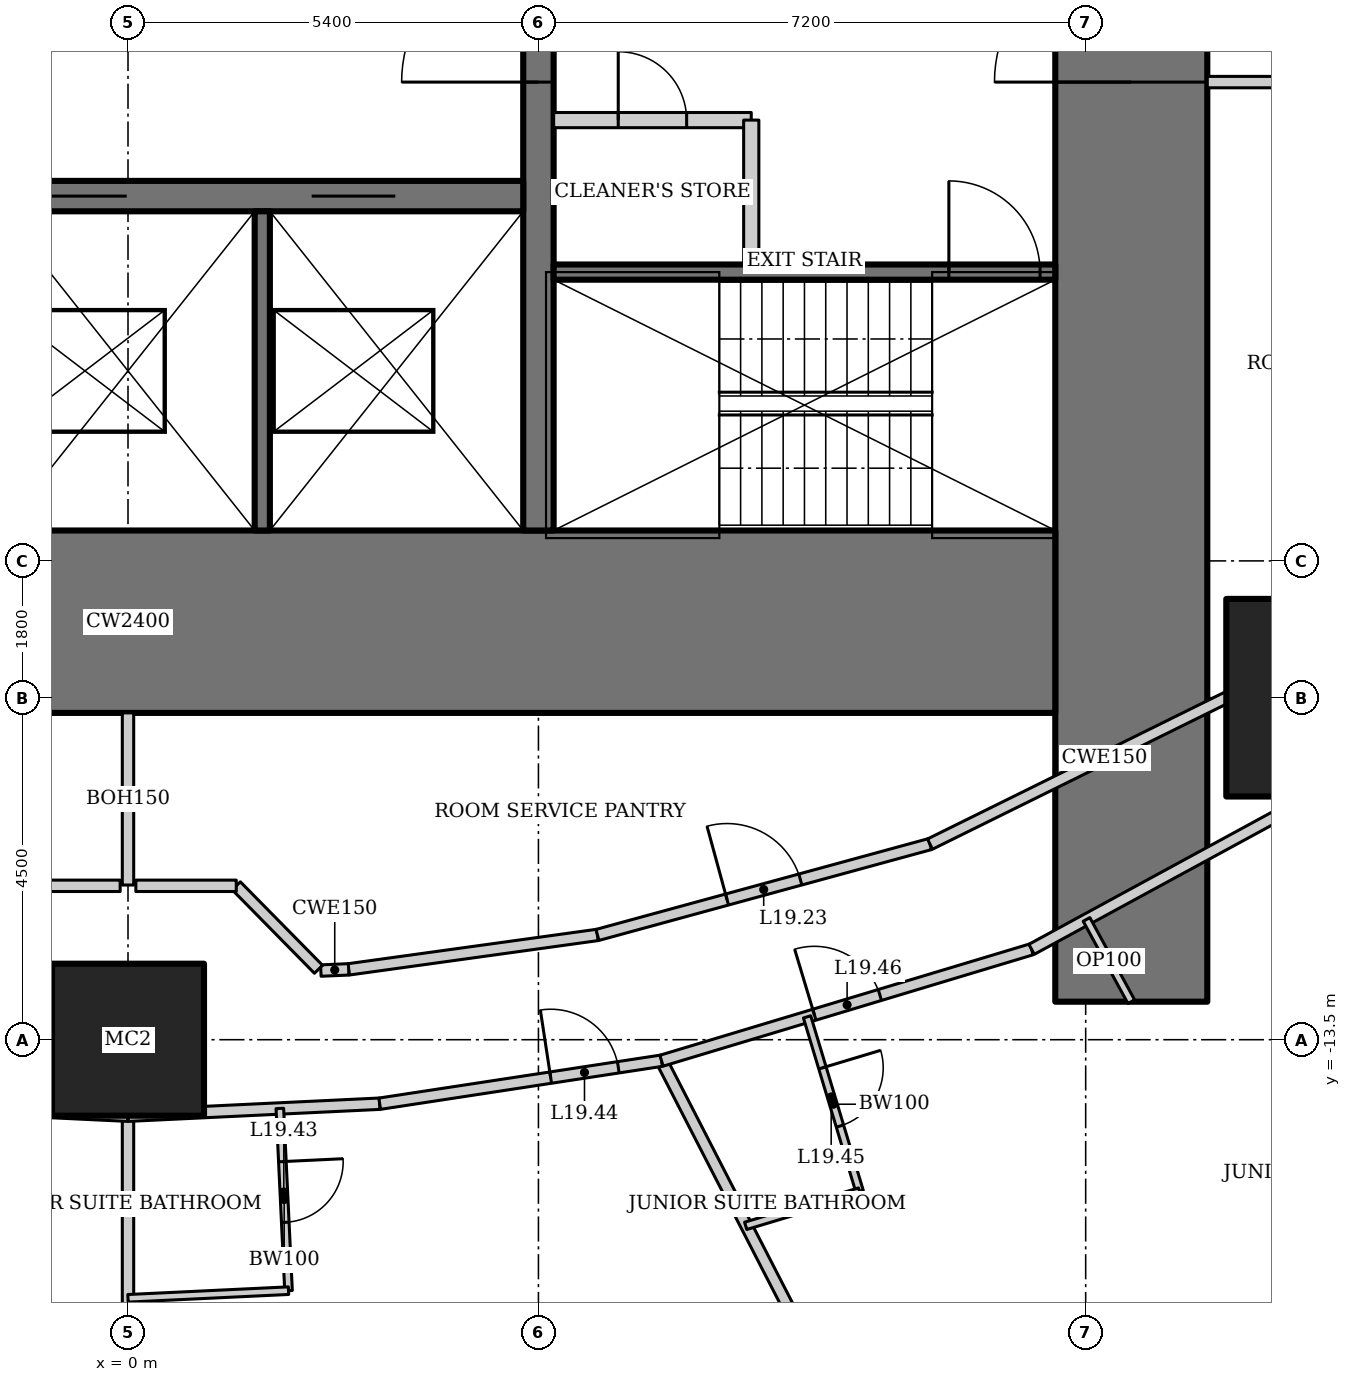
"""IFC4 building model, lengths in metres.
Left out: names, types, materials, properties, quantities, classifications, styles, units other than length and angle.
Written with IfcOpenShell. Run it as: python <this file> out.ifc"""

import sys

from ifc_helpers import new_model, si_unit, direction, frame, frame_2d, origin, origin_2d, place, context, subcontext, project, spatial, rectangle, hollow_rectangle, extrude, element, fill, save


model = new_model("IFC4")
c1 = context("Model", 3, precision=1e-05, world=origin(), true_north=direction((0.0, 1.0)))
c2 = subcontext(c1, "Body", "Model", "MODEL_VIEW")
j1 = project(units=[si_unit("LENGTHUNIT", "METRE"), si_unit("PLANEANGLEUNIT", "RADIAN")], contexts=[c1])
p1 = place(None, origin())
s1 = spatial("IfcSite", under=j1, at=p1, CompositionType="ELEMENT")
p2 = place(p1, origin())
s2 = spatial("IfcBuilding", under=s1, at=p2, CompositionType="ELEMENT")
p3 = place(p2, frame((0.0, 0.0, 83.8)))
s3 = spatial("IfcBuildingStorey", under=s2, at=p3, CompositionType="ELEMENT", Elevation=83.8)
p4 = place(p3, frame((0.0, -13.5, 0.0), z_axis=(0.0, 0.0, 1.0), x_axis=(1.0, 0.0, 0.0)))
e1 = element("IfcColumn", 1, at=p4, inside=s3, PredefinedType="COLUMN", context=c2, shape_type="SweptSolid", body=[
    extrude(hollow_rectangle(XDim=2.0, YDim=2.0, WallThickness=0.17, at=origin_2d()), origin(), (0.0, 0.0, 1.0), 3.6),
])
p5 = place(p3, frame((15.75, -9.0, 0.0), z_axis=(0.0, 0.0, 1.0), x_axis=(1.0, 0.0, 0.0)))
e2 = element("IfcColumn", 2, at=p5, inside=s3, PredefinedType="COLUMN", context=c2, shape_type="SweptSolid", body=[
    extrude(hollow_rectangle(XDim=2.6, YDim=2.6, WallThickness=0.13, at=origin_2d()), origin(), (0.0, 0.0, 1.0), 3.6),
])
p6 = place(p3, frame((13.2, -13.0, 0.0), z_axis=(0.0, 0.0, 1.0), x_axis=(0.0, 1.0, 0.0)))
e3 = element("IfcWall", 3, at=p6, inside=s3, PredefinedType="SHEAR", context=c2, shape_type="SweptSolid", body=[
    extrude(rectangle(XDim=26.0, YDim=2.0, at=frame_2d((13.0, 0.0))), origin(), (0.0, 0.0, 1.0), 3.6),
])
p7 = place(p6, frame((12.1, 0.0, 0.0)))
e4 = element("IfcOpeningElement", 4, at=p7, cuts=e3, PredefinedType="OPENING", context=c2, shape_type="SweptSolid", body=[
    extrude(rectangle(XDim=1.8, YDim=2.1, at=frame_2d((0.9, 1.05))), frame((0.0, 1.01, 0.0), z_axis=(0.0, -1.0, 0.0), x_axis=(1.0, 0.0, 0.0)), (0.0, 0.0, 1.0), 2.02),
])
p8 = place(p3, frame((-12.2, -8.0, 0.0), z_axis=(0.0, 0.0, 1.0), x_axis=(1.0, 0.0, 0.0)))
e5 = element("IfcWall", 5, at=p8, inside=s3, PredefinedType="SHEAR", context=c2, shape_type="SweptSolid", body=[
    extrude(rectangle(XDim=24.4, YDim=2.4, at=frame_2d((12.2, 0.0))), origin(), (0.0, 0.0, 1.0), 3.6),
])
p9 = place(p3, frame((5.4, -6.8, 0.0), z_axis=(0.0, 0.0, 1.0), x_axis=(0.0, 1.0, 0.0)))
e6 = element("IfcWall", 6, at=p9, inside=s3, PredefinedType="SHEAR", context=c2, shape_type="SweptSolid", body=[
    extrude(rectangle(XDim=13.6, YDim=0.4, at=frame_2d((6.8, 0.0))), origin(), (0.0, 0.0, 1.0), 3.6),
])
p10 = place(p9, frame((5.9, 0.0, 0.0)))
e7 = element("IfcOpeningElement", 7, at=p10, cuts=e6, PredefinedType="OPENING", context=c2, shape_type="SweptSolid", body=[
    extrude(rectangle(XDim=1.8, YDim=2.1, at=frame_2d((0.9, 1.05))), frame((0.0, 0.21, 0.0), z_axis=(0.0, -1.0, 0.0), x_axis=(1.0, 0.0, 0.0)), (0.0, 0.0, 1.0), 0.42),
])
p11 = place(p3, frame((-5.2, -2.4, 0.0), z_axis=(0.0, 0.0, 1.0), x_axis=(1.0, 0.0, 0.0)))
e8 = element("IfcWall", 8, at=p11, inside=s3, PredefinedType="SHEAR", context=c2, shape_type="SweptSolid", body=[
    extrude(rectangle(XDim=10.4, YDim=0.4, at=frame_2d((5.2, 0.0))), origin(), (0.0, 0.0, 1.0), 3.6),
])
p12 = place(p11, frame((0.55, 0.0, 0.0)))
e9 = element("IfcOpeningElement", 9, at=p12, cuts=e8, PredefinedType="OPENING", context=c2, shape_type="SweptSolid", body=[
    extrude(rectangle(XDim=1.1, YDim=2.2, at=frame_2d((0.55, 1.1))), frame((0.0, 0.21, 0.0), z_axis=(0.0, -1.0, 0.0), x_axis=(1.0, 0.0, 0.0)), (0.0, 0.0, 1.0), 0.42),
])
p13 = place(p11, frame((4.083, 0.0, 0.0)))
e10 = element("IfcOpeningElement", 10, at=p13, cuts=e8, PredefinedType="OPENING", context=c2, shape_type="SweptSolid", body=[
    extrude(rectangle(XDim=1.1, YDim=2.2, at=frame_2d((0.55, 1.1))), frame((0.0, 0.21, 0.0), z_axis=(0.0, -1.0, 0.0), x_axis=(1.0, 0.0, 0.0)), (0.0, 0.0, 1.0), 0.42),
])
p14 = place(p11, frame((7.617, 0.0, 0.0)))
e11 = element("IfcOpeningElement", 11, at=p14, cuts=e8, PredefinedType="OPENING", context=c2, shape_type="SweptSolid", body=[
    extrude(rectangle(XDim=1.1, YDim=2.2, at=frame_2d((0.55, 1.1))), frame((0.0, 0.21, 0.0), z_axis=(0.0, -1.0, 0.0), x_axis=(1.0, 0.0, 0.0)), (0.0, 0.0, 1.0), 0.42),
])
p15 = place(p3, frame((1.767, -2.6, 0.0), z_axis=(0.0, 0.0, 1.0), x_axis=(0.0, -1.0, 0.0)))
e12 = element("IfcWall", 12, at=p15, inside=s3, PredefinedType="SOLIDWALL", context=c2, shape_type="SweptSolid", body=[
    extrude(rectangle(XDim=4.2, YDim=0.2, at=frame_2d((2.1, 0.0))), origin(), (0.0, 0.0, 1.0), 3.6),
])
p16 = place(p3, frame((5.6, -3.4, 0.0), z_axis=(0.0, 0.0, 1.0), x_axis=(1.0, 0.0, 0.0)))
e13 = element("IfcWall", 13, at=p16, inside=s3, PredefinedType="SHEAR", context=c2, shape_type="SweptSolid", body=[
    extrude(rectangle(XDim=6.6, YDim=0.2, at=frame_2d((3.3, 0.0))), origin(), (0.0, 0.0, 1.0), 3.6),
])
p17 = place(p16, frame((5.2, 0.0, 0.0)))
e14 = element("IfcOpeningElement", 14, at=p17, cuts=e13, PredefinedType="OPENING", context=c2, shape_type="SweptSolid", body=[
    extrude(rectangle(XDim=1.2, YDim=2.1, at=frame_2d((0.6, 1.05))), frame((0.0, 0.11, 0.0), z_axis=(0.0, -1.0, 0.0), x_axis=(1.0, 0.0, 0.0)), (0.0, 0.0, 1.0), 0.22),
])
p18 = place(p3, frame((5.6, -1.4, 0.0), z_axis=(0.0, 0.0, 1.0), x_axis=(1.0, 0.0, 0.0)))
e15 = element("IfcWall", 15, at=p18, inside=s3, PredefinedType="SOLIDWALL", context=c2, shape_type="SweptSolid", body=[
    extrude(rectangle(XDim=2.6, YDim=0.2, at=frame_2d((1.3, 0.0))), origin(), (0.0, 0.0, 1.0), 3.45),
])
p19 = place(p18, frame((0.85, 0.0, 0.0)))
e16 = element("IfcOpeningElement", 16, at=p19, cuts=e15, PredefinedType="OPENING", context=c2, shape_type="SweptSolid", body=[
    extrude(rectangle(XDim=0.9, YDim=2.1, at=frame_2d((0.45, 1.05))), frame((0.0, 0.11, 0.0), z_axis=(0.0, -1.0, 0.0), x_axis=(1.0, 0.0, 0.0)), (0.0, 0.0, 1.0), 0.22),
])
p20 = place(p3, frame((8.2, -1.4, 0.0), z_axis=(0.0, 0.0, 1.0), x_axis=(0.0, -1.0, 0.0)))
e17 = element("IfcWall", 17, at=p20, inside=s3, PredefinedType="SOLIDWALL", context=c2, shape_type="SweptSolid", body=[
    extrude(rectangle(XDim=1.9, YDim=0.2, at=frame_2d((0.95, 0.0))), origin(), (0.0, 0.0, 1.0), 3.45),
])
p21 = place(p3, frame((0.0, -22.825, 0.0), z_axis=(0.0, 0.0, 1.0), x_axis=(0.0, 1.0, 0.0)))
e18 = element("IfcWall", 18, at=p21, inside=s3, PredefinedType="PARTITIONING", context=c2, shape_type="SweptSolid", body=[
    extrude(rectangle(XDim=8.325, YDim=0.15, at=frame_2d((4.162, 0.0))), origin(), (0.0, 0.0, 1.0), 2.924),
])
p22 = place(p3, frame((10.912, -21.346, 0.0), z_axis=(0.0, 0.0, 1.0), x_axis=(-0.457327273085, 0.889298468059, 0.0)))
e19 = element("IfcWall", 19, at=p22, inside=s3, PredefinedType="PARTITIONING", context=c2, shape_type="SweptSolid", body=[
    extrude(rectangle(XDim=8.511, YDim=0.15, at=frame_2d((4.256, 0.0))), origin(), (0.0, 0.0, 1.0), 2.528),
])
p23 = place(p3, frame((-3.311, -14.342, 0.0), z_axis=(0.0, 0.0, 1.0), x_axis=(0.998863968075, -0.047652631422, 0.0)))
e20 = element("IfcWall", 20, at=p23, inside=s3, PredefinedType="PARTITIONING", context=c2, shape_type="SweptSolid", body=[
    extrude(rectangle(XDim=3.315, YDim=0.15, at=frame_2d((1.657, 0.0))), origin(), (0.0, 0.0, 1.0), 3.45),
])
p24 = place(p23, frame((0.15, 0.0, 0.0)))
e21 = element("IfcOpeningElement", 21, at=p24, cuts=e20, PredefinedType="OPENING", context=c2, shape_type="SweptSolid", body=[
    extrude(rectangle(XDim=0.9, YDim=2.1, at=frame_2d((0.45, 1.05))), frame((0.0, 0.085, 0.0), z_axis=(0.0, -1.0, 0.0), x_axis=(1.0, 0.0, 0.0)), (0.0, 0.0, 1.0), 0.17),
])
p25 = place(p3, frame((0.0, -14.5, 0.0), z_axis=(0.0, 0.0, 1.0), x_axis=(0.998863968075, 0.047652631422, 0.0)))
e22 = element("IfcWall", 22, at=p25, inside=s3, PredefinedType="PARTITIONING", context=c2, shape_type="SweptSolid", body=[
    extrude(rectangle(XDim=3.315, YDim=0.15, at=frame_2d((1.657, 0.0))), origin(), (0.0, 0.0, 1.0), 3.45),
])
p26 = place(p3, frame((3.311, -14.342, 0.0), z_axis=(0.0, 0.0, 1.0), x_axis=(0.988564270062, 0.150800145746, 0.0)))
e23 = element("IfcWall", 23, at=p26, inside=s3, PredefinedType="PARTITIONING", context=c2, shape_type="SweptSolid", body=[
    extrude(rectangle(XDim=3.751, YDim=0.15, at=frame_2d((1.875, 0.0))), origin(), (0.0, 0.0, 1.0), 3.45),
])
p27 = place(p26, frame((2.276, 0.0, 0.0)))
e24 = element("IfcOpeningElement", 24, at=p27, cuts=e23, PredefinedType="OPENING", context=c2, shape_type="SweptSolid", body=[
    extrude(rectangle(XDim=0.9, YDim=2.1, at=frame_2d((0.45, 1.05))), frame((0.0, 0.085, 0.0), z_axis=(0.0, -1.0, 0.0), x_axis=(1.0, 0.0, 0.0)), (0.0, 0.0, 1.0), 0.17),
])
p28 = place(p3, frame((7.019, -13.776, 0.0), z_axis=(0.0, 0.0, 1.0), x_axis=(0.957564241242, 0.288219922793, 0.0)))
e25 = element("IfcWall", 25, at=p28, inside=s3, PredefinedType="PARTITIONING", context=c2, shape_type="SweptSolid", body=[
    extrude(rectangle(XDim=5.085, YDim=0.15, at=frame_2d((2.542, 0.0))), origin(), (0.0, 0.0, 1.0), 3.45),
])
p29 = place(p28, frame((2.1, 0.0, 0.0)))
e26 = element("IfcOpeningElement", 26, at=p29, cuts=e25, PredefinedType="OPENING", context=c2, shape_type="SweptSolid", body=[
    extrude(rectangle(XDim=0.9, YDim=2.1, at=frame_2d((0.45, 1.05))), frame((0.0, 0.085, 0.0), z_axis=(0.0, -1.0, 0.0), x_axis=(1.0, 0.0, 0.0)), (0.0, 0.0, 1.0), 0.17),
])
p30 = place(p3, frame((11.888, -12.311, 0.0), z_axis=(0.0, 0.0, 1.0), x_axis=(0.878450059298, 0.477834169267, 0.0)))
e27 = element("IfcWall", 27, at=p30, inside=s3, PredefinedType="PARTITIONING", context=c2, shape_type="SweptSolid", body=[
    extrude(rectangle(XDim=5.631, YDim=0.15, at=frame_2d((2.815, 0.0))), origin(), (0.0, 0.0, 1.0), 3.45),
])
p31 = place(p3, frame((2.903, -12.574, 0.0), z_axis=(0.0, 0.0, 1.0), x_axis=(0.990563451353, 0.137054911782, 0.0)))
e28 = element("IfcWall", 28, at=p31, inside=s3, PredefinedType="PARTITIONING", context=c2, shape_type="SweptSolid", body=[
    extrude(rectangle(XDim=3.304, YDim=0.15, at=frame_2d((1.652, 0.0))), origin(), (0.0, 0.0, 1.0), 3.45),
])
p32 = place(p3, frame((6.176, -12.122, 0.0), z_axis=(0.0, 0.0, 1.0), x_axis=(0.964644466646, 0.263554648923, 0.0)))
e29 = element("IfcWall", 29, at=p32, inside=s3, PredefinedType="PARTITIONING", context=c2, shape_type="SweptSolid", body=[
    extrude(rectangle(XDim=4.535, YDim=0.15, at=frame_2d((2.268, 0.0))), origin(), (0.0, 0.0, 1.0), 3.45),
])
p33 = place(p32, frame((1.768, 0.0, 0.0)))
e30 = element("IfcOpeningElement", 30, at=p33, cuts=e29, PredefinedType="OPENING", context=c2, shape_type="SweptSolid", body=[
    extrude(rectangle(XDim=1.0, YDim=2.1, at=frame_2d((0.5, 1.05))), frame((0.0, 0.085, 0.0), z_axis=(0.0, -1.0, 0.0), x_axis=(1.0, 0.0, 0.0)), (0.0, 0.0, 1.0), 0.17),
])
p34 = place(p3, frame((10.551, -10.926, 0.0), z_axis=(0.0, 0.0, 1.0), x_axis=(0.89656943448, 0.442903205177, 0.0)))
e31 = element("IfcWall", 31, at=p34, inside=s3, PredefinedType="PARTITIONING", context=c2, shape_type="SweptSolid", body=[
    extrude(rectangle(XDim=5.126, YDim=0.15, at=frame_2d((2.563, 0.0))), origin(), (0.0, 0.0, 1.0), 3.45),
])
p35 = place(p3, frame((1.998, -14.405, 0.0), z_axis=(0.0, 0.0, 1.0), x_axis=(0.047608648396, -0.998866065395, 0.0)))
e32 = element("IfcWall", 32, at=p35, inside=s3, PredefinedType="PARTITIONING", context=c2, shape_type="SweptSolid", body=[
    extrude(rectangle(XDim=2.4, YDim=0.1, at=frame_2d((1.2, 0.0))), origin(), (0.0, 0.0, 1.0), 2.749),
])
p36 = place(p35, frame((0.7, 0.0, 0.0)))
e33 = element("IfcOpeningElement", 33, at=p36, cuts=e32, PredefinedType="OPENING", context=c2, shape_type="SweptSolid", body=[
    extrude(rectangle(XDim=0.8, YDim=2.1, at=frame_2d((0.4, 1.05))), frame((0.0, 0.06, 0.0), z_axis=(0.0, -1.0, 0.0), x_axis=(1.0, 0.0, 0.0)), (0.0, 0.0, 1.0), 0.12),
])
p37 = place(p3, frame((2.112, -16.802, 0.0), z_axis=(0.0, 0.0, 1.0), x_axis=(-0.998862383453, -0.047685835668, 0.0)))
e34 = element("IfcWall", 34, at=p37, inside=s3, PredefinedType="PARTITIONING", context=c2, shape_type="SweptSolid", body=[
    extrude(rectangle(XDim=2.115, YDim=0.1, at=frame_2d((1.057, 0.0))), origin(), (0.0, 0.0, 1.0), 3.45),
])
p38 = place(p3, frame((8.935, -13.2, 0.0), z_axis=(0.0, 0.0, 1.0), x_axis=(0.288197066254, -0.957571120598, 0.0)))
e35 = element("IfcWall", 35, at=p38, inside=s3, PredefinedType="PARTITIONING", context=c2, shape_type="SweptSolid", body=[
    extrude(rectangle(XDim=2.4, YDim=0.1, at=frame_2d((1.2, 0.0))), origin(), (0.0, 0.0, 1.0), 3.45),
])
p39 = place(p38, frame((0.7, 0.0, 0.0)))
e36 = element("IfcOpeningElement", 36, at=p39, cuts=e35, PredefinedType="OPENING", context=c2, shape_type="SweptSolid", body=[
    extrude(rectangle(XDim=0.8, YDim=2.1, at=frame_2d((0.4, 1.05))), frame((0.0, 0.06, 0.0), z_axis=(0.0, -1.0, 0.0), x_axis=(1.0, 0.0, 0.0)), (0.0, 0.0, 1.0), 0.12),
])
p40 = place(p3, frame((9.626, -15.498, 0.0), z_axis=(0.0, 0.0, 1.0), x_axis=(-0.957551231109, -0.288263143328, 0.0)))
e37 = element("IfcWall", 37, at=p40, inside=s3, PredefinedType="PARTITIONING", context=c2, shape_type="SweptSolid", body=[
    extrude(rectangle(XDim=1.566, YDim=0.1, at=frame_2d((0.783, 0.0))), origin(), (0.0, 0.0, 1.0), 3.45),
])
p41 = place(p3, frame((13.2, -13.0, 0.0), z_axis=(0.0, 0.0, 1.0), x_axis=(-0.477852414256, 0.878440134665, 0.0)))
e38 = element("IfcWall", 38, at=p41, inside=s3, PredefinedType="PARTITIONING", context=c2, shape_type="SweptSolid", body=[
    extrude(rectangle(XDim=1.232, YDim=0.1, at=frame_2d((0.616, 0.0))), origin(), (0.0, 0.0, 1.0), 3.45),
])
p42 = place(p3, frame((2.537, -12.59, 0.0), z_axis=(0.0, 0.0, 1.0), x_axis=(0.999061181733, 0.04332153223, 0.0)))
e39 = element("IfcWall", 39, at=p42, inside=s3, PredefinedType="PARTITIONING", context=c2, shape_type="SweptSolid", body=[
    extrude(rectangle(XDim=0.366, YDim=0.15, at=frame_2d((0.183, 0.0))), origin(), (0.0, 0.0, 1.0), 3.45),
])
p43 = place(p3, frame((0.0, -9.2, 0.0), z_axis=(0.0, 0.0, 1.0), x_axis=(0.0, -1.0, 0.0)))
e40 = element("IfcWall", 40, at=p43, inside=s3, PredefinedType="PARTITIONING", context=c2, shape_type="SweptSolid", body=[
    extrude(rectangle(XDim=2.265, YDim=0.15, at=frame_2d((1.133, 0.0))), origin(), (0.0, 0.0, 1.0), 3.043),
])
p44 = place(p3, frame((-1.425, -11.475, 0.0), z_axis=(0.0, 0.0, 1.0), x_axis=(1.0, 0.0, 0.0)))
e41 = element("IfcWall", 41, at=p44, inside=s3, PredefinedType="PARTITIONING", context=c2, shape_type="SweptSolid", body=[
    extrude(rectangle(XDim=1.321, YDim=0.15, at=frame_2d((0.661, 0.0))), origin(), (0.0, 0.0, 1.0), 3.45),
])
p45 = place(p3, frame((1.425, -11.475, 0.0), z_axis=(0.0, 0.0, 1.0), x_axis=(0.701622806479, -0.712548550927, 0.0)))
e42 = element("IfcWall", 42, at=p45, inside=s3, PredefinedType="PARTITIONING", context=c2, shape_type="SweptSolid", body=[
    extrude(rectangle(XDim=1.542, YDim=0.15, at=frame_2d((0.771, 0.0))), origin(), (0.0, 0.0, 1.0), 3.45),
])
p46 = place(p3, frame((0.103, -11.475, 0.0), z_axis=(0.0, 0.0, 1.0), x_axis=(1.0, 0.0, 0.0)))
e43 = element("IfcWall", 43, at=p46, inside=s3, PredefinedType="PARTITIONING", context=c2, shape_type="SweptSolid", body=[
    extrude(rectangle(XDim=1.321, YDim=0.15, at=frame_2d((0.661, 0.0))), origin(), (0.0, 0.0, 1.0), 3.45),
])
p47 = place(p3, frame((14.2, -0.9, 0.0), z_axis=(0.0, 0.0, 1.0), x_axis=(1.0, 0.0, 0.0)))
e44 = element("IfcWall", 44, at=p47, inside=s3, PredefinedType="PARTITIONING", context=c2, shape_type="SweptSolid", body=[
    extrude(rectangle(XDim=0.965, YDim=0.15, at=frame_2d((0.482, 0.0))), origin(), (0.0, 0.0, 1.0), 3.45),
])
p48 = place(p19, origin())
e45 = element("IfcDoor", 45, at=p48, inside=s3, OperationType="SINGLE_SWING_LEFT", PredefinedType="DOOR", context=c2, shape_type="SweptSolid", body=[
    extrude(rectangle(XDim=0.9, YDim=2.1, at=frame_2d((0.45, 1.05))), frame((0.0, 0.025, 0.0), z_axis=(0.0, -1.0, 0.0), x_axis=(1.0, 0.0, 0.0)), (0.0, 0.0, 1.0), 0.05),
])
fill(e16, e45)
p49 = place(p10, origin())
e46 = element("IfcDoor", 46, at=p49, inside=s3, OperationType="DOUBLE_DOOR_DOUBLE_SWING", PredefinedType="DOOR", context=c2, shape_type="SweptSolid", body=[
    extrude(rectangle(XDim=1.8, YDim=2.1, at=frame_2d((0.9, 1.05))), frame((0.0, 0.025, 0.0), z_axis=(0.0, -1.0, 0.0), x_axis=(1.0, 0.0, 0.0)), (0.0, 0.0, 1.0), 0.05),
])
fill(e7, e46)
p50 = place(p17, origin())
e47 = element("IfcDoor", 47, at=p50, inside=s3, OperationType="SINGLE_SWING_RIGHT", PredefinedType="DOOR", context=c2, shape_type="SweptSolid", body=[
    extrude(rectangle(XDim=1.2, YDim=2.1, at=frame_2d((0.6, 1.05))), frame((0.0, 0.025, 0.0), z_axis=(0.0, -1.0, 0.0), x_axis=(1.0, 0.0, 0.0)), (0.0, 0.0, 1.0), 0.05),
])
fill(e14, e47)
p51 = place(p7, origin())
e48 = element("IfcDoor", 48, at=p51, inside=s3, OperationType="DOUBLE_DOOR_DOUBLE_SWING", PredefinedType="DOOR", context=c2, shape_type="SweptSolid", body=[
    extrude(rectangle(XDim=1.8, YDim=2.1, at=frame_2d((0.9, 1.05))), frame((0.0, 0.025, 0.0), z_axis=(0.0, -1.0, 0.0), x_axis=(1.0, 0.0, 0.0)), (0.0, 0.0, 1.0), 0.05),
])
fill(e4, e48)
p52 = place(p13, origin())
e49 = element("IfcDoor", 49, at=p52, inside=s3, OperationType="DOUBLE_DOOR_SLIDING", PredefinedType="DOOR", context=c2, shape_type="SweptSolid", body=[
    extrude(rectangle(XDim=1.1, YDim=2.2, at=frame_2d((0.55, 1.1))), frame((0.0, 0.025, 0.0), z_axis=(0.0, -1.0, 0.0), x_axis=(1.0, 0.0, 0.0)), (0.0, 0.0, 1.0), 0.05),
])
fill(e10, e49)
p53 = place(p14, origin())
e50 = element("IfcDoor", 50, at=p53, inside=s3, OperationType="DOUBLE_DOOR_SLIDING", PredefinedType="DOOR", context=c2, shape_type="SweptSolid", body=[
    extrude(rectangle(XDim=1.1, YDim=2.2, at=frame_2d((0.55, 1.1))), frame((0.0, 0.025, 0.0), z_axis=(0.0, -1.0, 0.0), x_axis=(1.0, 0.0, 0.0)), (0.0, 0.0, 1.0), 0.05),
])
fill(e11, e50)
p54 = place(p33, origin())
e51 = element("IfcDoor", 51, at=p54, inside=s3, OperationType="SINGLE_SWING_LEFT", PredefinedType="DOOR", context=c2, shape_type="SweptSolid", body=[
    extrude(rectangle(XDim=1.0, YDim=2.1, at=frame_2d((0.5, 1.05))), frame((0.0, 0.025, 0.0), z_axis=(0.0, -1.0, 0.0), x_axis=(1.0, 0.0, 0.0)), (0.0, 0.0, 1.0), 0.05),
])
fill(e30, e51)
p55 = place(p36, origin())
e52 = element("IfcDoor", 52, at=p55, inside=s3, OperationType="SINGLE_SWING_LEFT", PredefinedType="DOOR", context=c2, shape_type="SweptSolid", body=[
    extrude(rectangle(XDim=0.8, YDim=2.1, at=frame_2d((0.4, 1.05))), frame((0.0, 0.025, 0.0), z_axis=(0.0, -1.0, 0.0), x_axis=(1.0, 0.0, 0.0)), (0.0, 0.0, 1.0), 0.05),
])
fill(e33, e52)
p56 = place(p27, origin())
e53 = element("IfcDoor", 53, at=p56, inside=s3, OperationType="SINGLE_SWING_LEFT", PredefinedType="DOOR", context=c2, shape_type="SweptSolid", body=[
    extrude(rectangle(XDim=0.9, YDim=2.1, at=frame_2d((0.45, 1.05))), frame((0.0, 0.025, 0.0), z_axis=(0.0, -1.0, 0.0), x_axis=(1.0, 0.0, 0.0)), (0.0, 0.0, 1.0), 0.05),
])
fill(e24, e53)
p57 = place(p39, origin())
e54 = element("IfcDoor", 54, at=p57, inside=s3, OperationType="SINGLE_SWING_LEFT", PredefinedType="DOOR", context=c2, shape_type="SweptSolid", body=[
    extrude(rectangle(XDim=0.8, YDim=2.1, at=frame_2d((0.4, 1.05))), frame((0.0, 0.025, 0.0), z_axis=(0.0, -1.0, 0.0), x_axis=(1.0, 0.0, 0.0)), (0.0, 0.0, 1.0), 0.05),
])
fill(e36, e54)
p58 = place(p29, origin())
e55 = element("IfcDoor", 55, at=p58, inside=s3, OperationType="SINGLE_SWING_LEFT", PredefinedType="DOOR", context=c2, shape_type="SweptSolid", body=[
    extrude(rectangle(XDim=0.9, YDim=2.1, at=frame_2d((0.45, 1.05))), frame((0.0, 0.025, 0.0), z_axis=(0.0, -1.0, 0.0), x_axis=(1.0, 0.0, 0.0)), (0.0, 0.0, 1.0), 0.05),
])
fill(e26, e55)
save(model, sys.argv[1])
